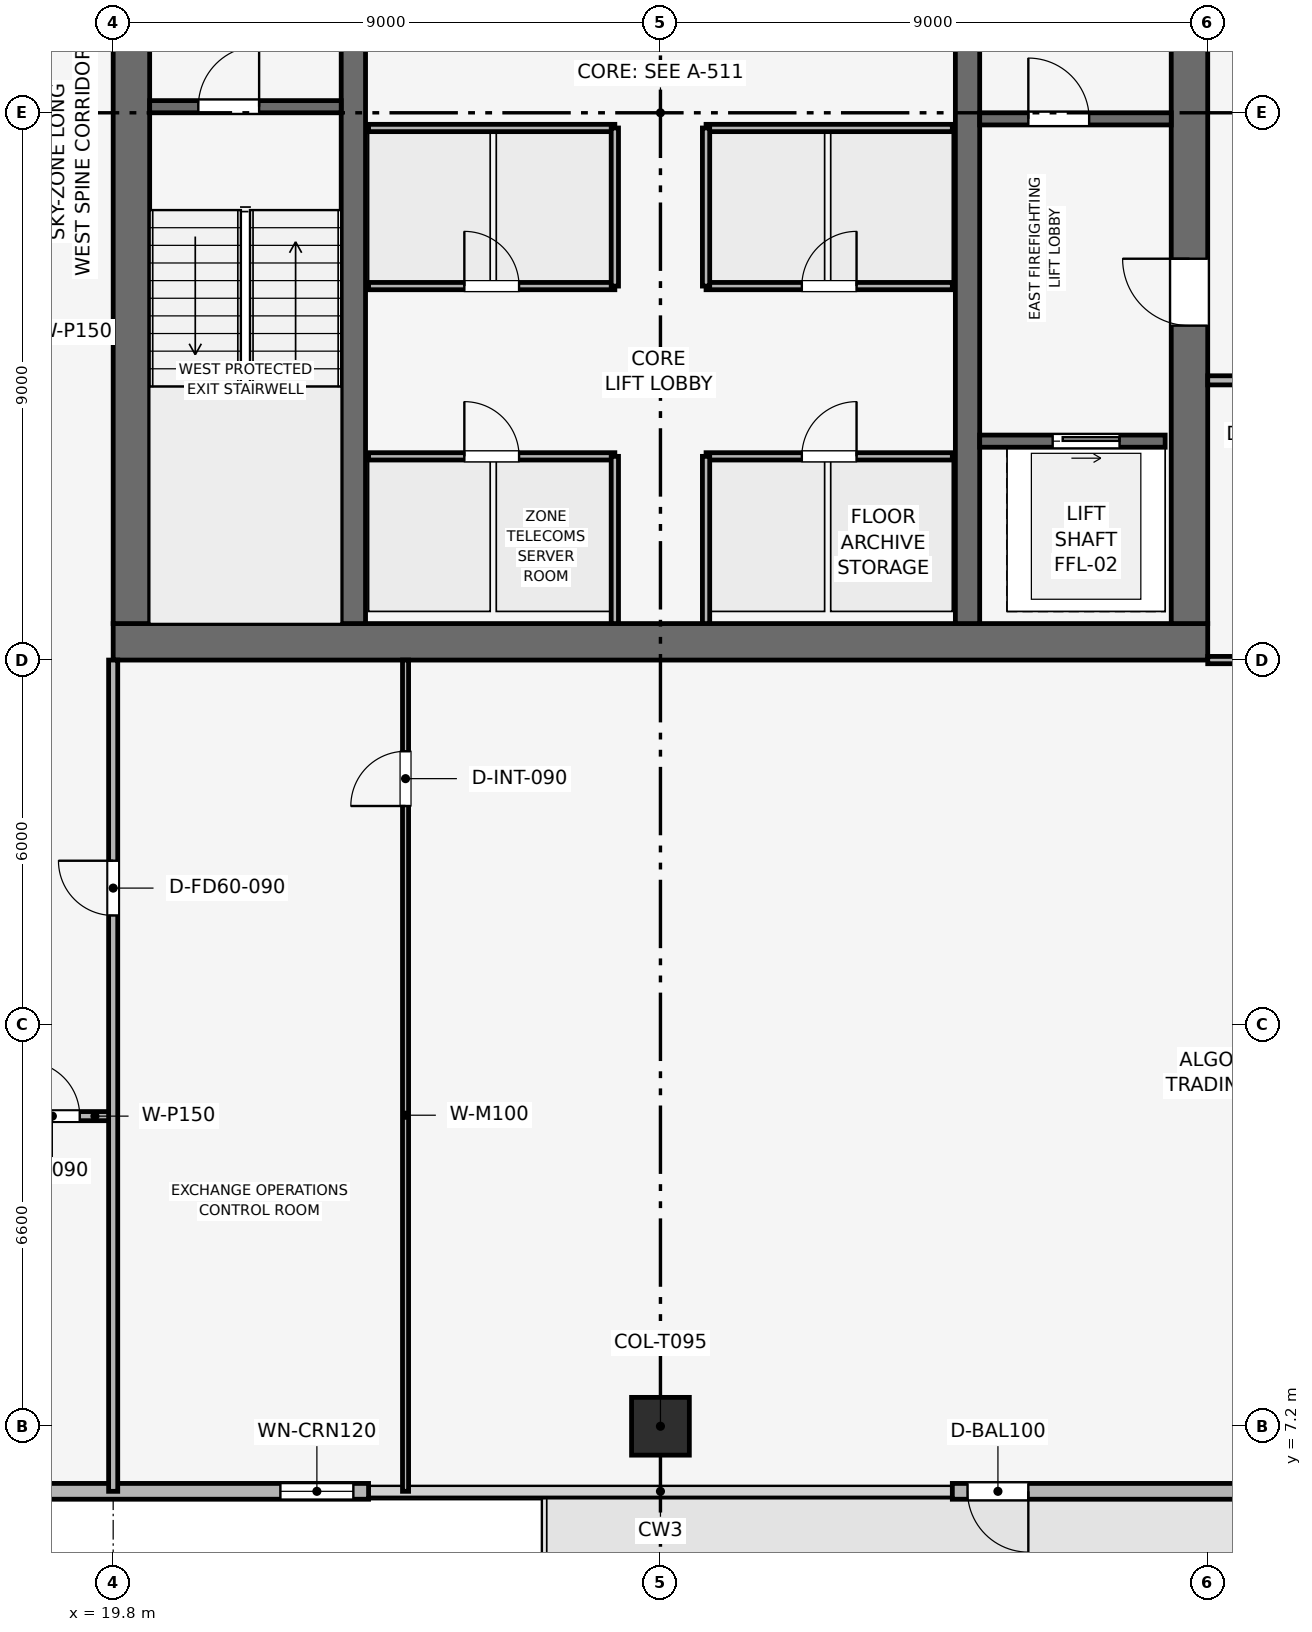
"""IFC4 building model, lengths in metres.
Left out: names, types, materials, properties, quantities, classifications, styles, units other than length and angle.
Written with IfcOpenShell. Run it as: python <this file> out.ifc"""

import sys

from ifc_helpers import new_model, si_unit, direction, frame, frame_2d, origin, origin_2d, place, context, subcontext, project, spatial, rectangle, extrude, element, fill, save


model = new_model("IFC4")
c1 = context("Model", 3, precision=1e-05, world=origin(), true_north=direction((0.0, 1.0)))
c2 = subcontext(c1, "Body", "Model", "MODEL_VIEW")
j1 = project(units=[si_unit("LENGTHUNIT", "METRE"), si_unit("PLANEANGLEUNIT", "RADIAN")], contexts=[c1])
p1 = place(None, origin())
s1 = spatial("IfcSite", under=j1, at=p1, CompositionType="ELEMENT")
p2 = place(p1, origin())
s2 = spatial("IfcBuilding", under=s1, at=p2, CompositionType="ELEMENT")
p3 = place(p2, frame((0.0, 0.0, 299.25)))
s3 = spatial("IfcBuildingStorey", under=s2, at=p3, CompositionType="ELEMENT", Elevation=299.25)
p4 = place(p3, frame((19.8, 20.1, 0.0), z_axis=(0.0, 0.0, 1.0), x_axis=(1.0, 0.0, 0.0)))
e1 = element("IfcWall", 1, at=p4, inside=s3, PredefinedType="SHEAR", context=c2, shape_type="SweptSolid", body=[
    extrude(rectangle(XDim=18.0, YDim=0.6, at=frame_2d((9.0, 0.0))), origin(), (0.0, 0.0, 1.0), 3.75),
])
p5 = place(p3, frame((20.1, 20.4, 0.0), z_axis=(0.0, 0.0, 1.0), x_axis=(0.0, 1.0, 0.0)))
e2 = element("IfcWall", 2, at=p5, inside=s3, PredefinedType="SHEAR", context=c2, shape_type="SweptSolid", body=[
    extrude(rectangle(XDim=16.8, YDim=0.6, at=frame_2d((8.4, 0.0))), origin(), (0.0, 0.0, 1.0), 3.75),
])
p6 = place(p5, frame((10.4, 0.0, 0.0)))
e3 = element("IfcOpeningElement", 3, at=p6, cuts=e2, PredefinedType="OPENING", context=c2, shape_type="SweptSolid", body=[
    extrude(rectangle(XDim=1.1, YDim=2.15, at=frame_2d((0.55, 1.075))), frame((0.0, 0.31, 0.0), z_axis=(0.0, -1.0, 0.0), x_axis=(1.0, 0.0, 0.0)), (0.0, 0.0, 1.0), 0.62),
])
p7 = place(p3, frame((37.5, 20.4, 0.0), z_axis=(0.0, 0.0, 1.0), x_axis=(0.0, 1.0, 0.0)))
e4 = element("IfcWall", 4, at=p7, inside=s3, PredefinedType="SHEAR", context=c2, shape_type="SweptSolid", body=[
    extrude(rectangle(XDim=16.8, YDim=0.6, at=frame_2d((8.4, 0.0))), origin(), (0.0, 0.0, 1.0), 3.75),
])
p8 = place(p7, frame((4.9, 0.0, 0.0)))
e5 = element("IfcOpeningElement", 5, at=p8, cuts=e4, PredefinedType="OPENING", context=c2, shape_type="SweptSolid", body=[
    extrude(rectangle(XDim=1.1, YDim=2.15, at=frame_2d((0.55, 1.075))), frame((0.0, 0.31, 0.0), z_axis=(0.0, -1.0, 0.0), x_axis=(1.0, 0.0, 0.0)), (0.0, 0.0, 1.0), 0.62),
])
for number, where, z_axis, x_axis in (
    (6, (23.75, 20.4, 0.0), (0.0, 0.0, 1.0), (0.0, 1.0, 0.0)),
    (7, (33.85, 20.4, 0.0), (0.0, 0.0, 1.0), (0.0, 1.0, 0.0)),
):
    element("IfcWall", number, at=place(p3, frame(where, z_axis=z_axis, x_axis=x_axis)), inside=s3, PredefinedType="SHEAR", context=c2, shape_type="SweptSolid", body=[
        extrude(rectangle(XDim=16.8, YDim=0.4, at=frame_2d((8.4, 0.0))), origin(), (0.0, 0.0, 1.0), 3.75),
    ])
p9 = place(p3, frame((28.8, 7.2, 0.003), z_axis=(0.0, 0.0, 1.0), x_axis=(1.0, 0.0, 0.0)))
e8 = element("IfcColumn", 8, at=p9, inside=s3, PredefinedType="COLUMN", context=c2, shape_type="SweptSolid", body=[
    extrude(rectangle(XDim=0.95, YDim=0.95, at=origin_2d()), origin(), (0.0, 0.0, 1.0), 3.504),
])
p10 = place(p3, frame((45.3, 6.13, 0.0), z_axis=(0.0, 0.0, 1.0), x_axis=(-1.0, 0.0, 0.0)))
e9 = element("IfcWall", 9, at=p10, inside=s3, PredefinedType="SOLIDWALL", context=c2, shape_type="SweptSolid", body=[
    extrude(rectangle(XDim=11.7, YDim=0.26, at=frame_2d((5.85, 0.0))), origin(), (0.0, 0.0, 1.0), 3.51),
])
p11 = place(p10, frame((10.45, 0.0, 0.0)))
e10 = element("IfcOpeningElement", 10, at=p11, cuts=e9, PredefinedType="OPENING", context=c2, shape_type="SweptSolid", body=[
    extrude(rectangle(XDim=1.0, YDim=2.2, at=frame_2d((0.5, 1.1))), frame((0.0, 0.14, 0.0), z_axis=(0.0, -1.0, 0.0), x_axis=(1.0, 0.0, 0.0)), (0.0, 0.0, 1.0), 0.28),
])
p12 = place(p3, frame((24.0, 6.13, 0.0), z_axis=(0.0, 0.0, 1.0), x_axis=(-1.0, 0.0, 0.0)))
e11 = element("IfcWall", 11, at=p12, inside=s3, PredefinedType="SOLIDWALL", context=c2, shape_type="SweptSolid", body=[
    extrude(rectangle(XDim=11.7, YDim=0.26, at=frame_2d((5.85, 0.0))), origin(), (0.0, 0.0, 1.0), 3.51),
])
p13 = place(p12, frame((0.25, 0.0, 0.9)))
e12 = element("IfcOpeningElement", 12, at=p13, cuts=e11, PredefinedType="OPENING", context=c2, shape_type="SweptSolid", body=[
    extrude(rectangle(XDim=1.2, YDim=2.1, at=frame_2d((0.6, 1.05))), frame((0.0, 0.14, 0.0), z_axis=(0.0, -1.0, 0.0), x_axis=(1.0, 0.0, 0.0)), (0.0, 0.0, 1.0), 0.28),
])
p14 = place(p3, frame((20.4, 28.9, 0.0), z_axis=(0.0, 0.0, 1.0), x_axis=(1.0, 0.0, 0.0)))
e13 = element("IfcWall", 13, at=p14, inside=s3, PredefinedType="SHEAR", context=c2, shape_type="SweptSolid", body=[
    extrude(rectangle(XDim=3.15, YDim=0.2, at=frame_2d((1.575, 0.0))), origin(), (0.0, 0.0, 1.0), 3.51),
])
p15 = place(p14, frame((0.8, 0.0, 0.0)))
e14 = element("IfcOpeningElement", 14, at=p15, cuts=e13, PredefinedType="OPENING", context=c2, shape_type="SweptSolid", body=[
    extrude(rectangle(XDim=1.0, YDim=2.1, at=frame_2d((0.5, 1.05))), frame((0.0, 0.11, 0.0), z_axis=(0.0, -1.0, 0.0), x_axis=(1.0, 0.0, 0.0)), (0.0, 0.0, 1.0), 0.22),
])
p16 = place(p3, frame((34.05, 28.7, 0.0), z_axis=(0.0, 0.0, 1.0), x_axis=(1.0, 0.0, 0.0)))
e15 = element("IfcWall", 15, at=p16, inside=s3, PredefinedType="SHEAR", context=c2, shape_type="SweptSolid", body=[
    extrude(rectangle(XDim=3.15, YDim=0.2, at=frame_2d((1.575, 0.0))), origin(), (0.0, 0.0, 1.0), 3.51),
])
p17 = place(p16, frame((0.8, 0.0, 0.0)))
e16 = element("IfcOpeningElement", 16, at=p17, cuts=e15, PredefinedType="OPENING", context=c2, shape_type="SweptSolid", body=[
    extrude(rectangle(XDim=1.0, YDim=2.1, at=frame_2d((0.5, 1.05))), frame((0.0, 0.11, 0.0), z_axis=(0.0, -1.0, 0.0), x_axis=(1.0, 0.0, 0.0)), (0.0, 0.0, 1.0), 0.22),
])
p18 = place(p3, frame((34.05, 23.4, 0.0), z_axis=(0.0, 0.0, 1.0), x_axis=(1.0, 0.0, 0.0)))
e17 = element("IfcWall", 17, at=p18, inside=s3, PredefinedType="SHEAR", context=c2, shape_type="SweptSolid", body=[
    extrude(rectangle(XDim=3.05, YDim=0.2, at=frame_2d((1.525, 0.0))), origin(), (0.0, 0.0, 1.0), 3.51),
])
p19 = place(p18, frame((1.2, 0.0, 0.0)))
e18 = element("IfcOpeningElement", 18, at=p19, cuts=e17, PredefinedType="OPENING", context=c2, shape_type="SweptSolid", body=[
    extrude(rectangle(XDim=1.1, YDim=2.15, at=frame_2d((0.55, 1.075))), frame((0.0, 0.11, 0.0), z_axis=(0.0, -1.0, 0.0), x_axis=(1.0, 0.0, 0.0)), (0.0, 0.0, 1.0), 0.22),
])
p20 = place(p3, frame((24.0, 23.15, 0.0), z_axis=(0.0, 0.0, 1.0), x_axis=(1.0, 0.0, 0.0)))
e19 = element("IfcWall", 19, at=p20, inside=s3, PredefinedType="PARTITIONING", context=c2, shape_type="SweptSolid", body=[
    extrude(rectangle(XDim=4.05, YDim=0.12, at=frame_2d((2.025, 0.0))), origin(), (0.0, 0.0, 1.0), 3.51),
])
p21 = place(p20, frame((1.575, 0.0, 0.0)))
e20 = element("IfcOpeningElement", 20, at=p21, cuts=e19, PredefinedType="OPENING", context=c2, shape_type="SweptSolid", body=[
    extrude(rectangle(XDim=0.9, YDim=2.1, at=frame_2d((0.45, 1.05))), frame((0.0, 0.07, 0.0), z_axis=(0.0, -1.0, 0.0), x_axis=(1.0, 0.0, 0.0)), (0.0, 0.0, 1.0), 0.14),
])
p22 = place(p3, frame((28.05, 20.4, 0.0), z_axis=(0.0, 0.0, 1.0), x_axis=(0.0, 1.0, 0.0)))
e21 = element("IfcWall", 21, at=p22, inside=s3, PredefinedType="PARTITIONING", context=c2, shape_type="SweptSolid", body=[
    extrude(rectangle(XDim=2.75, YDim=0.12, at=frame_2d((1.375, 0.0))), origin(), (0.0, 0.0, 1.0), 3.51),
])
p23 = place(p3, frame((29.55, 23.15, 0.0), z_axis=(0.0, 0.0, 1.0), x_axis=(1.0, 0.0, 0.0)))
e22 = element("IfcWall", 22, at=p23, inside=s3, PredefinedType="PARTITIONING", context=c2, shape_type="SweptSolid", body=[
    extrude(rectangle(XDim=4.05, YDim=0.12, at=frame_2d((2.025, 0.0))), origin(), (0.0, 0.0, 1.0), 3.51),
])
p24 = place(p23, frame((1.575, 0.0, 0.0)))
e23 = element("IfcOpeningElement", 23, at=p24, cuts=e22, PredefinedType="OPENING", context=c2, shape_type="SweptSolid", body=[
    extrude(rectangle(XDim=0.9, YDim=2.1, at=frame_2d((0.45, 1.05))), frame((0.0, 0.07, 0.0), z_axis=(0.0, -1.0, 0.0), x_axis=(1.0, 0.0, 0.0)), (0.0, 0.0, 1.0), 0.14),
])
p25 = place(p3, frame((29.55, 20.4, 0.0), z_axis=(0.0, 0.0, 1.0), x_axis=(0.0, 1.0, 0.0)))
e24 = element("IfcWall", 24, at=p25, inside=s3, PredefinedType="PARTITIONING", context=c2, shape_type="SweptSolid", body=[
    extrude(rectangle(XDim=2.75, YDim=0.12, at=frame_2d((1.375, 0.0))), origin(), (0.0, 0.0, 1.0), 3.51),
])
p26 = place(p3, frame((24.0, 25.95, 0.0), z_axis=(0.0, 0.0, 1.0), x_axis=(1.0, 0.0, 0.0)))
e25 = element("IfcWall", 25, at=p26, inside=s3, PredefinedType="PARTITIONING", context=c2, shape_type="SweptSolid", body=[
    extrude(rectangle(XDim=4.05, YDim=0.12, at=frame_2d((2.025, 0.0))), origin(), (0.0, 0.0, 1.0), 3.51),
])
p27 = place(p26, frame((1.575, 0.0, 0.0)))
e26 = element("IfcOpeningElement", 26, at=p27, cuts=e25, PredefinedType="OPENING", context=c2, shape_type="SweptSolid", body=[
    extrude(rectangle(XDim=0.9, YDim=2.1, at=frame_2d((0.45, 1.05))), frame((0.0, 0.07, 0.0), z_axis=(0.0, -1.0, 0.0), x_axis=(1.0, 0.0, 0.0)), (0.0, 0.0, 1.0), 0.14),
])
p28 = place(p3, frame((24.0, 28.55, 0.0), z_axis=(0.0, 0.0, 1.0), x_axis=(1.0, 0.0, 0.0)))
e27 = element("IfcWall", 27, at=p28, inside=s3, PredefinedType="PARTITIONING", context=c2, shape_type="SweptSolid", body=[
    extrude(rectangle(XDim=4.05, YDim=0.12, at=frame_2d((2.025, 0.0))), origin(), (0.0, 0.0, 1.0), 3.51),
])
p29 = place(p3, frame((28.05, 25.95, 0.0), z_axis=(0.0, 0.0, 1.0), x_axis=(0.0, 1.0, 0.0)))
e28 = element("IfcWall", 28, at=p29, inside=s3, PredefinedType="PARTITIONING", context=c2, shape_type="SweptSolid", body=[
    extrude(rectangle(XDim=2.6, YDim=0.12, at=frame_2d((1.3, 0.0))), origin(), (0.0, 0.0, 1.0), 3.51),
])
p30 = place(p3, frame((29.55, 25.95, 0.0), z_axis=(0.0, 0.0, 1.0), x_axis=(1.0, 0.0, 0.0)))
e29 = element("IfcWall", 29, at=p30, inside=s3, PredefinedType="PARTITIONING", context=c2, shape_type="SweptSolid", body=[
    extrude(rectangle(XDim=4.05, YDim=0.12, at=frame_2d((2.025, 0.0))), origin(), (0.0, 0.0, 1.0), 3.51),
])
p31 = place(p30, frame((1.575, 0.0, 0.0)))
e30 = element("IfcOpeningElement", 30, at=p31, cuts=e29, PredefinedType="OPENING", context=c2, shape_type="SweptSolid", body=[
    extrude(rectangle(XDim=0.9, YDim=2.1, at=frame_2d((0.45, 1.05))), frame((0.0, 0.07, 0.0), z_axis=(0.0, -1.0, 0.0), x_axis=(1.0, 0.0, 0.0)), (0.0, 0.0, 1.0), 0.14),
])
p32 = place(p3, frame((29.55, 28.55, 0.0), z_axis=(0.0, 0.0, 1.0), x_axis=(1.0, 0.0, 0.0)))
e31 = element("IfcWall", 31, at=p32, inside=s3, PredefinedType="PARTITIONING", context=c2, shape_type="SweptSolid", body=[
    extrude(rectangle(XDim=4.05, YDim=0.12, at=frame_2d((2.025, 0.0))), origin(), (0.0, 0.0, 1.0), 3.51),
])
p33 = place(p3, frame((29.55, 25.95, 0.0), z_axis=(0.0, 0.0, 1.0), x_axis=(0.0, 1.0, 0.0)))
e32 = element("IfcWall", 32, at=p33, inside=s3, PredefinedType="PARTITIONING", context=c2, shape_type="SweptSolid", body=[
    extrude(rectangle(XDim=2.6, YDim=0.12, at=frame_2d((1.3, 0.0))), origin(), (0.0, 0.0, 1.0), 3.51),
])
p34 = place(p3, frame((17.9, 12.3, 0.0), z_axis=(0.0, 0.0, 1.0), x_axis=(1.0, 0.0, 0.0)))
e33 = element("IfcWall", 33, at=p34, inside=s3, PredefinedType="PARTITIONING", context=c2, shape_type="SweptSolid", body=[
    extrude(rectangle(XDim=1.9, YDim=0.15, at=frame_2d((0.95, 0.0))), origin(), (0.0, 0.0, 1.0), 3.51),
])
p35 = place(p34, frame((0.45, 0.0, 0.0)))
e34 = element("IfcOpeningElement", 34, at=p35, cuts=e33, PredefinedType="OPENING", context=c2, shape_type="SweptSolid", body=[
    extrude(rectangle(XDim=0.9, YDim=2.1, at=frame_2d((0.45, 1.05))), frame((0.0, 0.085, 0.0), z_axis=(0.0, -1.0, 0.0), x_axis=(1.0, 0.0, 0.0)), (0.0, 0.0, 1.0), 0.17),
])
p36 = place(p3, frame((19.8, 6.13, 0.0), z_axis=(0.0, 0.0, 1.0), x_axis=(0.0, 1.0, 0.0)))
e35 = element("IfcWall", 35, at=p36, inside=s3, PredefinedType="PARTITIONING", context=c2, shape_type="SweptSolid", body=[
    extrude(rectangle(XDim=13.67, YDim=0.15, at=frame_2d((6.835, 0.0))), origin(), (0.0, 0.0, 1.0), 3.095),
])
p37 = place(p36, frame((9.47, 0.0, 0.0)))
e36 = element("IfcOpeningElement", 36, at=p37, cuts=e35, PredefinedType="OPENING", context=c2, shape_type="SweptSolid", body=[
    extrude(rectangle(XDim=0.9, YDim=2.1, at=frame_2d((0.45, 1.05))), frame((0.0, 0.085, 0.0), z_axis=(0.0, -1.0, 0.0), x_axis=(1.0, 0.0, 0.0)), (0.0, 0.0, 1.0), 0.17),
])
p38 = place(p3, frame((24.608, 6.13, 0.0), z_axis=(0.0, 0.0, 1.0), x_axis=(0.0, 1.0, 0.0)))
e37 = element("IfcWall", 37, at=p38, inside=s3, PredefinedType="MOVABLE", context=c2, shape_type="SweptSolid", body=[
    extrude(rectangle(XDim=13.67, YDim=0.1, at=frame_2d((6.835, 0.0))), origin(), (0.0, 0.0, 1.0), 3.135),
])
p39 = place(p38, frame((11.27, 0.0, 0.0)))
e38 = element("IfcOpeningElement", 38, at=p39, cuts=e37, PredefinedType="OPENING", context=c2, shape_type="SweptSolid", body=[
    extrude(rectangle(XDim=0.9, YDim=2.1, at=frame_2d((0.45, 1.05))), frame((0.0, 0.06, 0.0), z_axis=(0.0, -1.0, 0.0), x_axis=(1.0, 0.0, 0.0)), (0.0, 0.0, 1.0), 0.12),
])
p40 = place(p3, frame((37.8, 19.8, 0.0), z_axis=(0.0, 0.0, 1.0), x_axis=(1.0, 0.0, 0.0)))
e39 = element("IfcWall", 39, at=p40, inside=s3, PredefinedType="PARTITIONING", context=c2, shape_type="SweptSolid", body=[
    extrude(rectangle(XDim=13.67, YDim=0.12, at=frame_2d((6.835, 0.0))), origin(), (0.0, 0.0, 1.0), 3.095),
])
p41 = place(p3, frame((37.8, 24.4, 0.0), z_axis=(0.0, 0.0, 1.0), x_axis=(1.0, 0.0, 0.0)))
e40 = element("IfcWall", 40, at=p41, inside=s3, PredefinedType="PARTITIONING", context=c2, shape_type="SweptSolid", body=[
    extrude(rectangle(XDim=1.9, YDim=0.15, at=frame_2d((0.95, 0.0))), origin(), (0.0, 0.0, 1.0), 3.51),
])
p42 = place(p41, frame((0.45, 0.0, 0.0)))
e41 = element("IfcOpeningElement", 41, at=p42, cuts=e40, PredefinedType="OPENING", context=c2, shape_type="SweptSolid", body=[
    extrude(rectangle(XDim=0.9, YDim=2.1, at=frame_2d((0.45, 1.05))), frame((0.0, 0.085, 0.0), z_axis=(0.0, -1.0, 0.0), x_axis=(1.0, 0.0, 0.0)), (0.0, 0.0, 1.0), 0.17),
])
p43 = place(p11, origin())
e42 = element("IfcDoor", 42, at=p43, inside=s3, OperationType="SINGLE_SWING_LEFT", PredefinedType="DOOR", context=c2, shape_type="SweptSolid", body=[
    extrude(rectangle(XDim=1.0, YDim=2.2, at=frame_2d((0.5, 1.1))), frame((0.0, 0.025, 0.0), z_axis=(0.0, -1.0, 0.0), x_axis=(1.0, 0.0, 0.0)), (0.0, 0.0, 1.0), 0.05),
])
fill(e10, e42)
p44 = place(p13, origin())
e43 = element("IfcWindow", 43, at=p44, inside=s3, PartitioningType="SINGLE_PANEL", PredefinedType="WINDOW", context=c2, shape_type="SweptSolid", body=[
    extrude(rectangle(XDim=1.2, YDim=2.1, at=frame_2d((0.6, 1.05))), frame((0.0, 0.03, 0.0), z_axis=(0.0, -1.0, 0.0), x_axis=(1.0, 0.0, 0.0)), (0.0, 0.0, 1.0), 0.06),
])
fill(e12, e43)
p45 = place(p15, origin())
e44 = element("IfcDoor", 44, at=p45, inside=s3, OperationType="SINGLE_SWING_RIGHT", PredefinedType="DOOR", context=c2, shape_type="SweptSolid", body=[
    extrude(rectangle(XDim=1.0, YDim=2.1, at=frame_2d((0.5, 1.05))), frame((0.0, 0.025, 0.0), z_axis=(0.0, -1.0, 0.0), x_axis=(1.0, 0.0, 0.0)), (0.0, 0.0, 1.0), 0.05),
])
fill(e14, e44)
p46 = place(p17, origin())
e45 = element("IfcDoor", 45, at=p46, inside=s3, OperationType="SINGLE_SWING_LEFT", PredefinedType="DOOR", context=c2, shape_type="SweptSolid", body=[
    extrude(rectangle(XDim=1.0, YDim=2.1, at=frame_2d((0.5, 1.05))), frame((0.0, 0.025, 0.0), z_axis=(0.0, -1.0, 0.0), x_axis=(1.0, 0.0, 0.0)), (0.0, 0.0, 1.0), 0.05),
])
fill(e16, e45)
p47 = place(p19, origin())
e46 = element("IfcDoor", 46, at=p47, inside=s3, OperationType="SLIDING_TO_RIGHT", PredefinedType="DOOR", context=c2, shape_type="SweptSolid", body=[
    extrude(rectangle(XDim=1.1, YDim=2.15, at=frame_2d((0.55, 1.075))), frame((0.0, 0.025, 0.0), z_axis=(0.0, -1.0, 0.0), x_axis=(1.0, 0.0, 0.0)), (0.0, 0.0, 1.0), 0.05),
])
fill(e18, e46)
p48 = place(p21, origin())
e47 = element("IfcDoor", 47, at=p48, inside=s3, OperationType="SINGLE_SWING_LEFT", PredefinedType="DOOR", context=c2, shape_type="SweptSolid", body=[
    extrude(rectangle(XDim=0.9, YDim=2.1, at=frame_2d((0.45, 1.05))), frame((0.0, 0.025, 0.0), z_axis=(0.0, -1.0, 0.0), x_axis=(1.0, 0.0, 0.0)), (0.0, 0.0, 1.0), 0.05),
])
fill(e20, e47)
p49 = place(p24, origin())
e48 = element("IfcDoor", 48, at=p49, inside=s3, OperationType="SINGLE_SWING_RIGHT", PredefinedType="DOOR", context=c2, shape_type="SweptSolid", body=[
    extrude(rectangle(XDim=0.9, YDim=2.1, at=frame_2d((0.45, 1.05))), frame((0.0, 0.025, 0.0), z_axis=(0.0, -1.0, 0.0), x_axis=(1.0, 0.0, 0.0)), (0.0, 0.0, 1.0), 0.05),
])
fill(e23, e48)
p50 = place(p27, origin())
e49 = element("IfcDoor", 49, at=p50, inside=s3, OperationType="SINGLE_SWING_LEFT", PredefinedType="DOOR", context=c2, shape_type="SweptSolid", body=[
    extrude(rectangle(XDim=0.9, YDim=2.1, at=frame_2d((0.45, 1.05))), frame((0.0, 0.025, 0.0), z_axis=(0.0, -1.0, 0.0), x_axis=(1.0, 0.0, 0.0)), (0.0, 0.0, 1.0), 0.05),
])
fill(e26, e49)
p51 = place(p31, origin())
e50 = element("IfcDoor", 50, at=p51, inside=s3, OperationType="SINGLE_SWING_RIGHT", PredefinedType="DOOR", context=c2, shape_type="SweptSolid", body=[
    extrude(rectangle(XDim=0.9, YDim=2.1, at=frame_2d((0.45, 1.05))), frame((0.0, 0.025, 0.0), z_axis=(0.0, -1.0, 0.0), x_axis=(1.0, 0.0, 0.0)), (0.0, 0.0, 1.0), 0.05),
])
fill(e30, e50)
p52 = place(p35, origin())
e51 = element("IfcDoor", 51, at=p52, inside=s3, OperationType="SINGLE_SWING_LEFT", PredefinedType="DOOR", context=c2, shape_type="SweptSolid", body=[
    extrude(rectangle(XDim=0.9, YDim=2.1, at=frame_2d((0.45, 1.05))), frame((0.0, 0.025, 0.0), z_axis=(0.0, -1.0, 0.0), x_axis=(1.0, 0.0, 0.0)), (0.0, 0.0, 1.0), 0.05),
])
fill(e34, e51)
p53 = place(p37, origin())
e52 = element("IfcDoor", 52, at=p53, inside=s3, OperationType="SINGLE_SWING_RIGHT", PredefinedType="DOOR", context=c2, shape_type="SweptSolid", body=[
    extrude(rectangle(XDim=0.9, YDim=2.1, at=frame_2d((0.45, 1.05))), frame((0.0, 0.025, 0.0), z_axis=(0.0, -1.0, 0.0), x_axis=(1.0, 0.0, 0.0)), (0.0, 0.0, 1.0), 0.05),
])
fill(e36, e52)
p54 = place(p39, origin())
e53 = element("IfcDoor", 53, at=p54, inside=s3, OperationType="SINGLE_SWING_LEFT", PredefinedType="DOOR", context=c2, shape_type="SweptSolid", body=[
    extrude(rectangle(XDim=0.9, YDim=2.1, at=frame_2d((0.45, 1.05))), frame((0.0, 0.025, 0.0), z_axis=(0.0, -1.0, 0.0), x_axis=(1.0, 0.0, 0.0)), (0.0, 0.0, 1.0), 0.05),
])
fill(e38, e53)
p55 = place(p8, origin())
e54 = element("IfcDoor", 54, at=p55, inside=s3, OperationType="SINGLE_SWING_RIGHT", PredefinedType="DOOR", context=c2, shape_type="SweptSolid", body=[
    extrude(rectangle(XDim=1.1, YDim=2.15, at=frame_2d((0.55, 1.075))), frame((0.0, 0.025, 0.0), z_axis=(0.0, -1.0, 0.0), x_axis=(1.0, 0.0, 0.0)), (0.0, 0.0, 1.0), 0.05),
])
fill(e5, e54)
save(model, sys.argv[1])
